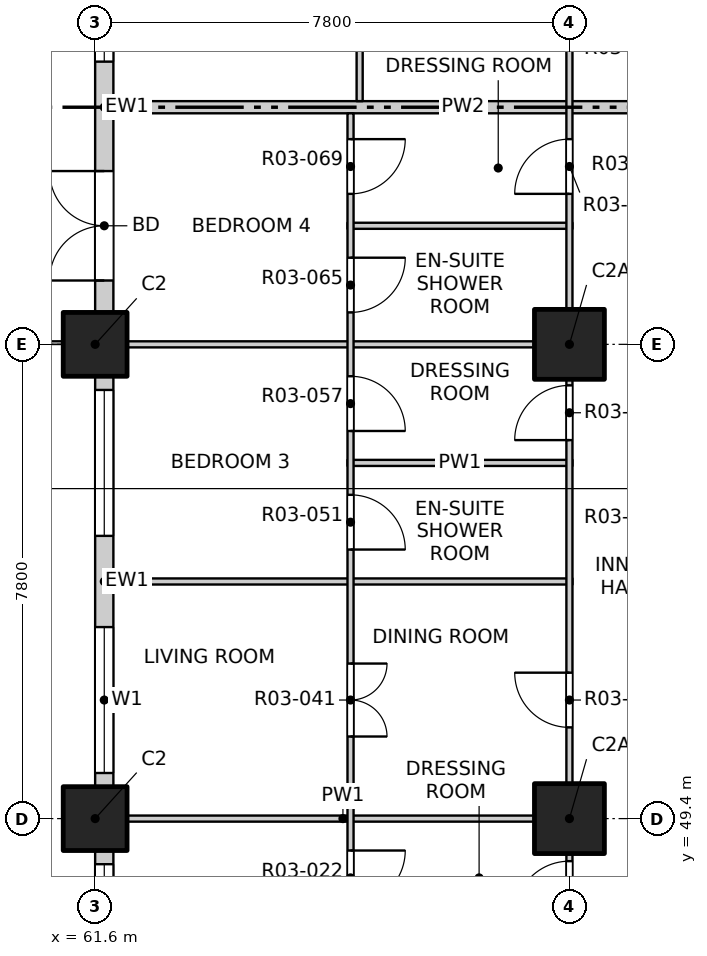
"""IFC4 building model, lengths in metres.
Left out: names, types, materials, properties, quantities, classifications, styles, units other than length and angle.
Written with IfcOpenShell. Run it as: python <this file> out.ifc"""

import sys

from ifc_helpers import new_model, si_unit, direction, frame, frame_2d, origin, origin_2d, place, context, subcontext, project, spatial, rectangle, extrude, element, fill, save


model = new_model("IFC4")
c1 = context("Model", 3, precision=1e-05, world=origin(), true_north=direction((0.0, 1.0)))
c2 = subcontext(c1, "Body", "Model", "MODEL_VIEW")
j1 = project(units=[si_unit("LENGTHUNIT", "METRE"), si_unit("PLANEANGLEUNIT", "RADIAN")], contexts=[c1])
p1 = place(None, origin())
s1 = spatial("IfcSite", under=j1, at=p1, CompositionType="ELEMENT")
p2 = place(p1, origin())
s2 = spatial("IfcBuilding", under=s1, at=p2, CompositionType="ELEMENT")
p3 = place(p2, frame((0.0, 0.0, 43.3)))
s3 = spatial("IfcBuildingStorey", under=s2, at=p3, CompositionType="ELEMENT", Elevation=43.3)
for number, where, z_axis, x_axis in (
    (1, (61.6, 49.4, -0.25), (0.0, 0.0, 1.0), (1.0, 0.0, 0.0)),
    (2, (61.6, 57.2, -0.25), (0.0, 0.0, 1.0), (1.0, 0.0, 0.0)),
):
    element("IfcColumn", number, at=place(p3, frame(where, z_axis=z_axis, x_axis=x_axis)), inside=s3, PredefinedType="COLUMN", context=c2, shape_type="SweptSolid", body=[
        extrude(rectangle(XDim=1.05, YDim=1.05, at=origin_2d()), origin(), (0.0, 0.0, 1.0), 3.35),
    ])
for number, where, z_axis, x_axis in (
    (3, (69.4, 49.4, -0.25), (0.0, 0.0, 1.0), (1.0, 0.0, 0.0)),
    (4, (69.4, 57.2, -0.25), (0.0, 0.0, 1.0), (1.0, 0.0, 0.0)),
):
    element("IfcColumn", number, at=place(p3, frame(where, z_axis=z_axis, x_axis=x_axis)), inside=s3, PredefinedType="COLUMN", context=c2, shape_type="SweptSolid", body=[
        extrude(rectangle(XDim=1.15, YDim=1.15, at=origin_2d()), origin(), (0.0, 0.0, 1.0), 3.35),
    ])
p4 = place(p3, frame((61.75, 45.5, 0.0), z_axis=(0.0, 0.0, 1.0), x_axis=(0.0, 1.0, 0.0)))
e5 = element("IfcWall", 5, at=p4, inside=s3, PredefinedType="SOLIDWALL", context=c2, shape_type="SweptSolid", body=[
    extrude(rectangle(XDim=3.375, YDim=0.3, at=frame_2d((1.688, 0.0))), origin(), (0.0, 0.0, 1.0), 3.1),
])
p5 = place(p4, frame((0.75, 0.0, 0.9)))
e6 = element("IfcOpeningElement", 6, at=p5, cuts=e5, PredefinedType="OPENING", context=c2, shape_type="SweptSolid", body=[
    extrude(rectangle(XDim=2.4, YDim=1.8, at=frame_2d((1.2, 0.9))), frame((0.0, 0.16, 0.0), z_axis=(0.0, -1.0, 0.0), x_axis=(1.0, 0.0, 0.0)), (0.0, 0.0, 1.0), 0.32),
])
p6 = place(p3, frame((61.75, 49.925, 0.0), z_axis=(0.0, 0.0, 1.0), x_axis=(0.0, 1.0, 0.0)))
e7 = element("IfcWall", 7, at=p6, inside=s3, PredefinedType="SOLIDWALL", context=c2, shape_type="SweptSolid", body=[
    extrude(rectangle(XDim=6.75, YDim=0.3, at=frame_2d((3.375, 0.0))), origin(), (0.0, 0.0, 1.0), 3.1),
])
p7 = place(p6, frame((0.225, 0.0, 0.9)))
e8 = element("IfcOpeningElement", 8, at=p7, cuts=e7, PredefinedType="OPENING", context=c2, shape_type="SweptSolid", body=[
    extrude(rectangle(XDim=2.4, YDim=1.8, at=frame_2d((1.2, 0.9))), frame((0.0, 0.16, 0.0), z_axis=(0.0, -1.0, 0.0), x_axis=(1.0, 0.0, 0.0)), (0.0, 0.0, 1.0), 0.32),
])
p8 = place(p6, frame((4.125, 0.0, 0.9)))
e9 = element("IfcOpeningElement", 9, at=p8, cuts=e7, PredefinedType="OPENING", context=c2, shape_type="SweptSolid", body=[
    extrude(rectangle(XDim=2.4, YDim=1.8, at=frame_2d((1.2, 0.9))), frame((0.0, 0.16, 0.0), z_axis=(0.0, -1.0, 0.0), x_axis=(1.0, 0.0, 0.0)), (0.0, 0.0, 1.0), 0.32),
])
p9 = place(p3, frame((61.75, 57.725, 0.0), z_axis=(0.0, 0.0, 1.0), x_axis=(0.0, 1.0, 0.0)))
e10 = element("IfcWall", 10, at=p9, inside=s3, PredefinedType="SOLIDWALL", context=c2, shape_type="SweptSolid", body=[
    extrude(rectangle(XDim=6.75, YDim=0.3, at=frame_2d((3.375, 0.0))), origin(), (0.0, 0.0, 1.0), 3.1),
])
p10 = place(p9, frame((0.525, 0.0, 0.0)))
e11 = element("IfcOpeningElement", 11, at=p10, cuts=e10, PredefinedType="OPENING", context=c2, shape_type="SweptSolid", body=[
    extrude(rectangle(XDim=1.8, YDim=2.4, at=frame_2d((0.9, 1.2))), frame((0.0, 0.16, 0.0), z_axis=(0.0, -1.0, 0.0), x_axis=(1.0, 0.0, 0.0)), (0.0, 0.0, 1.0), 0.32),
])
p11 = place(p9, frame((4.125, 0.0, 0.9)))
e12 = element("IfcOpeningElement", 12, at=p11, cuts=e10, PredefinedType="OPENING", context=c2, shape_type="SweptSolid", body=[
    extrude(rectangle(XDim=2.4, YDim=1.8, at=frame_2d((1.2, 0.9))), frame((0.0, 0.16, 0.0), z_axis=(0.0, -1.0, 0.0), x_axis=(1.0, 0.0, 0.0)), (0.0, 0.0, 1.0), 0.32),
])
for number, where, z_axis, x_axis in (
    (13, (61.9, 49.4, 0.0), (0.0, 0.0, 1.0), (1.0, 0.0, 0.0)),
    (14, (61.9, 53.3, 0.0), (0.0, 0.0, 1.0), (1.0, 0.0, 0.0)),
):
    element("IfcWall", number, at=place(p3, frame(where, z_axis=z_axis, x_axis=x_axis)), inside=s3, PredefinedType="PARTITIONING", context=c2, shape_type="SweptSolid", body=[
        extrude(rectangle(XDim=7.55, YDim=0.1, at=frame_2d((3.775, 0.0))), origin(), (0.0, 0.0, 1.0), 3.1),
    ])
p12 = place(p3, frame((65.75, 55.25, 0.0), z_axis=(0.0, 0.0, 1.0), x_axis=(1.0, 0.0, 0.0)))
e15 = element("IfcWall", 15, at=p12, inside=s3, PredefinedType="PARTITIONING", context=c2, shape_type="SweptSolid", body=[
    extrude(rectangle(XDim=3.7, YDim=0.1, at=frame_2d((1.85, 0.0))), origin(), (0.0, 0.0, 1.0), 3.1),
])
p13 = place(p3, frame((61.9, 57.2, 0.0), z_axis=(0.0, 0.0, 1.0), x_axis=(1.0, 0.0, 0.0)))
e16 = element("IfcWall", 16, at=p13, inside=s3, PredefinedType="PARTITIONING", context=c2, shape_type="SweptSolid", body=[
    extrude(rectangle(XDim=7.55, YDim=0.1, at=frame_2d((3.775, 0.0))), origin(), (0.0, 0.0, 1.0), 3.1),
])
p14 = place(p3, frame((65.75, 59.15, 0.0), z_axis=(0.0, 0.0, 1.0), x_axis=(1.0, 0.0, 0.0)))
e17 = element("IfcWall", 17, at=p14, inside=s3, PredefinedType="PARTITIONING", context=c2, shape_type="SweptSolid", body=[
    extrude(rectangle(XDim=3.7, YDim=0.1, at=frame_2d((1.85, 0.0))), origin(), (0.0, 0.0, 1.0), 3.1),
])
p15 = place(p3, frame((61.9, 61.1, 0.0), z_axis=(0.0, 0.0, 1.0), x_axis=(1.0, 0.0, 0.0)))
e18 = element("IfcWall", 18, at=p15, inside=s3, PredefinedType="PARTITIONING", context=c2, shape_type="SweptSolid", body=[
    extrude(rectangle(XDim=11.5, YDim=0.2, at=frame_2d((5.75, 0.0))), origin(), (0.0, 0.0, 1.0), 3.1),
])
p16 = place(p3, frame((65.8, 41.9, 0.0), z_axis=(0.0, 0.0, 1.0), x_axis=(0.0, 1.0, 0.0)))
e19 = element("IfcWall", 19, at=p16, inside=s3, PredefinedType="PARTITIONING", context=c2, shape_type="SweptSolid", body=[
    extrude(rectangle(XDim=19.1, YDim=0.1, at=frame_2d((9.55, 0.0))), origin(), (0.0, 0.0, 1.0), 3.1),
])
p17 = place(p16, frame((1.05, 0.0, 0.0)))
e20 = element("IfcOpeningElement", 20, at=p17, cuts=e19, PredefinedType="OPENING", context=c2, shape_type="SweptSolid", body=[
    extrude(rectangle(XDim=1.2, YDim=2.1, at=frame_2d((0.6, 1.05))), frame((0.0, 0.06, 0.0), z_axis=(0.0, -1.0, 0.0), x_axis=(1.0, 0.0, 0.0)), (0.0, 0.0, 1.0), 0.12),
])
p18 = place(p16, frame((4.125, 0.0, 0.0)))
e21 = element("IfcOpeningElement", 21, at=p18, cuts=e19, PredefinedType="OPENING", context=c2, shape_type="SweptSolid", body=[
    extrude(rectangle(XDim=0.9, YDim=2.1, at=frame_2d((0.45, 1.05))), frame((0.0, 0.06, 0.0), z_axis=(0.0, -1.0, 0.0), x_axis=(1.0, 0.0, 0.0)), (0.0, 0.0, 1.0), 0.12),
])
p19 = place(p16, frame((6.075, 0.0, 0.0)))
e22 = element("IfcOpeningElement", 22, at=p19, cuts=e19, PredefinedType="OPENING", context=c2, shape_type="SweptSolid", body=[
    extrude(rectangle(XDim=0.9, YDim=2.1, at=frame_2d((0.45, 1.05))), frame((0.0, 0.06, 0.0), z_axis=(0.0, -1.0, 0.0), x_axis=(1.0, 0.0, 0.0)), (0.0, 0.0, 1.0), 0.12),
])
p20 = place(p16, frame((8.85, 0.0, 0.0)))
e23 = element("IfcOpeningElement", 23, at=p20, cuts=e19, PredefinedType="OPENING", context=c2, shape_type="SweptSolid", body=[
    extrude(rectangle(XDim=1.2, YDim=2.1, at=frame_2d((0.6, 1.05))), frame((0.0, 0.06, 0.0), z_axis=(0.0, -1.0, 0.0), x_axis=(1.0, 0.0, 0.0)), (0.0, 0.0, 1.0), 0.12),
])
p21 = place(p16, frame((11.925, 0.0, 0.0)))
e24 = element("IfcOpeningElement", 24, at=p21, cuts=e19, PredefinedType="OPENING", context=c2, shape_type="SweptSolid", body=[
    extrude(rectangle(XDim=0.9, YDim=2.1, at=frame_2d((0.45, 1.05))), frame((0.0, 0.06, 0.0), z_axis=(0.0, -1.0, 0.0), x_axis=(1.0, 0.0, 0.0)), (0.0, 0.0, 1.0), 0.12),
])
p22 = place(p16, frame((13.875, 0.0, 0.0)))
e25 = element("IfcOpeningElement", 25, at=p22, cuts=e19, PredefinedType="OPENING", context=c2, shape_type="SweptSolid", body=[
    extrude(rectangle(XDim=0.9, YDim=2.1, at=frame_2d((0.45, 1.05))), frame((0.0, 0.06, 0.0), z_axis=(0.0, -1.0, 0.0), x_axis=(1.0, 0.0, 0.0)), (0.0, 0.0, 1.0), 0.12),
])
p23 = place(p16, frame((15.825, 0.0, 0.0)))
e26 = element("IfcOpeningElement", 26, at=p23, cuts=e19, PredefinedType="OPENING", context=c2, shape_type="SweptSolid", body=[
    extrude(rectangle(XDim=0.9, YDim=2.1, at=frame_2d((0.45, 1.05))), frame((0.0, 0.06, 0.0), z_axis=(0.0, -1.0, 0.0), x_axis=(1.0, 0.0, 0.0)), (0.0, 0.0, 1.0), 0.12),
])
p24 = place(p16, frame((17.775, 0.0, 0.0)))
e27 = element("IfcOpeningElement", 27, at=p24, cuts=e19, PredefinedType="OPENING", context=c2, shape_type="SweptSolid", body=[
    extrude(rectangle(XDim=0.9, YDim=2.1, at=frame_2d((0.45, 1.05))), frame((0.0, 0.06, 0.0), z_axis=(0.0, -1.0, 0.0), x_axis=(1.0, 0.0, 0.0)), (0.0, 0.0, 1.0), 0.12),
])
p25 = place(p3, frame((65.95, 61.2, 0.0), z_axis=(0.0, 0.0, 1.0), x_axis=(0.0, 1.0, 0.0)))
e28 = element("IfcWall", 28, at=p25, inside=s3, PredefinedType="PARTITIONING", context=c2, shape_type="SweptSolid", body=[
    extrude(rectangle(XDim=7.6, YDim=0.1, at=frame_2d((3.8, 0.0))), origin(), (0.0, 0.0, 1.0), 3.1),
])
p26 = place(p25, frame((1.25, 0.0, 0.0)))
e29 = element("IfcOpeningElement", 29, at=p26, cuts=e28, PredefinedType="OPENING", context=c2, shape_type="SweptSolid", body=[
    extrude(rectangle(XDim=1.2, YDim=2.1, at=frame_2d((0.6, 1.05))), frame((0.0, 0.06, 0.0), z_axis=(0.0, -1.0, 0.0), x_axis=(1.0, 0.0, 0.0)), (0.0, 0.0, 1.0), 0.12),
])
p27 = place(p25, frame((4.325, 0.0, 0.0)))
e30 = element("IfcOpeningElement", 30, at=p27, cuts=e28, PredefinedType="OPENING", context=c2, shape_type="SweptSolid", body=[
    extrude(rectangle(XDim=0.9, YDim=2.1, at=frame_2d((0.45, 1.05))), frame((0.0, 0.06, 0.0), z_axis=(0.0, -1.0, 0.0), x_axis=(1.0, 0.0, 0.0)), (0.0, 0.0, 1.0), 0.12),
])
p28 = place(p25, frame((6.275, 0.0, 0.0)))
e31 = element("IfcOpeningElement", 31, at=p28, cuts=e28, PredefinedType="OPENING", context=c2, shape_type="SweptSolid", body=[
    extrude(rectangle(XDim=0.9, YDim=2.1, at=frame_2d((0.45, 1.05))), frame((0.0, 0.06, 0.0), z_axis=(0.0, -1.0, 0.0), x_axis=(1.0, 0.0, 0.0)), (0.0, 0.0, 1.0), 0.12),
])
p29 = place(p3, frame((69.4, 41.9, 0.0), z_axis=(0.0, 0.0, 1.0), x_axis=(0.0, 1.0, 0.0)))
e32 = element("IfcWall", 32, at=p29, inside=s3, PredefinedType="PARTITIONING", context=c2, shape_type="SweptSolid", body=[
    extrude(rectangle(XDim=46.2, YDim=0.1, at=frame_2d((23.1, 0.0))), origin(), (0.0, 0.0, 1.0), 3.1),
])
p30 = place(p29, frame((1.2, 0.0, 0.0)))
e33 = element("IfcOpeningElement", 33, at=p30, cuts=e32, PredefinedType="OPENING", context=c2, shape_type="SweptSolid", body=[
    extrude(rectangle(XDim=0.9, YDim=2.1, at=frame_2d((0.45, 1.05))), frame((0.0, 0.06, 0.0), z_axis=(0.0, -1.0, 0.0), x_axis=(1.0, 0.0, 0.0)), (0.0, 0.0, 1.0), 0.12),
])
p31 = place(p29, frame((5.9, 0.0, 0.0)))
e34 = element("IfcOpeningElement", 34, at=p31, cuts=e32, PredefinedType="OPENING", context=c2, shape_type="SweptSolid", body=[
    extrude(rectangle(XDim=0.9, YDim=2.1, at=frame_2d((0.45, 1.05))), frame((0.0, 0.06, 0.0), z_axis=(0.0, -1.0, 0.0), x_axis=(1.0, 0.0, 0.0)), (0.0, 0.0, 1.0), 0.12),
])
p32 = place(p29, frame((9.0, 0.0, 0.0)))
e35 = element("IfcOpeningElement", 35, at=p32, cuts=e32, PredefinedType="OPENING", context=c2, shape_type="SweptSolid", body=[
    extrude(rectangle(XDim=0.9, YDim=2.1, at=frame_2d((0.45, 1.05))), frame((0.0, 0.06, 0.0), z_axis=(0.0, -1.0, 0.0), x_axis=(1.0, 0.0, 0.0)), (0.0, 0.0, 1.0), 0.12),
])
p33 = place(p29, frame((13.725, 0.0, 0.0)))
e36 = element("IfcOpeningElement", 36, at=p33, cuts=e32, PredefinedType="OPENING", context=c2, shape_type="SweptSolid", body=[
    extrude(rectangle(XDim=0.9, YDim=2.1, at=frame_2d((0.45, 1.05))), frame((0.0, 0.06, 0.0), z_axis=(0.0, -1.0, 0.0), x_axis=(1.0, 0.0, 0.0)), (0.0, 0.0, 1.0), 0.12),
])
p34 = place(p29, frame((17.775, 0.0, 0.0)))
e37 = element("IfcOpeningElement", 37, at=p34, cuts=e32, PredefinedType="OPENING", context=c2, shape_type="SweptSolid", body=[
    extrude(rectangle(XDim=0.9, YDim=2.1, at=frame_2d((0.45, 1.05))), frame((0.0, 0.06, 0.0), z_axis=(0.0, -1.0, 0.0), x_axis=(1.0, 0.0, 0.0)), (0.0, 0.0, 1.0), 0.12),
])
p35 = place(p29, frame((20.7, 0.0, 0.0)))
e38 = element("IfcOpeningElement", 38, at=p35, cuts=e32, PredefinedType="OPENING", context=c2, shape_type="SweptSolid", body=[
    extrude(rectangle(XDim=0.9, YDim=2.1, at=frame_2d((0.45, 1.05))), frame((0.0, 0.06, 0.0), z_axis=(0.0, -1.0, 0.0), x_axis=(1.0, 0.0, 0.0)), (0.0, 0.0, 1.0), 0.12),
])
p36 = place(p29, frame((25.575, 0.0, 0.0)))
e39 = element("IfcOpeningElement", 39, at=p36, cuts=e32, PredefinedType="OPENING", context=c2, shape_type="SweptSolid", body=[
    extrude(rectangle(XDim=0.9, YDim=2.1, at=frame_2d((0.45, 1.05))), frame((0.0, 0.06, 0.0), z_axis=(0.0, -1.0, 0.0), x_axis=(1.0, 0.0, 0.0)), (0.0, 0.0, 1.0), 0.12),
])
p37 = place(p29, frame((28.5, 0.0, 0.0)))
e40 = element("IfcOpeningElement", 40, at=p37, cuts=e32, PredefinedType="OPENING", context=c2, shape_type="SweptSolid", body=[
    extrude(rectangle(XDim=0.9, YDim=2.1, at=frame_2d((0.45, 1.05))), frame((0.0, 0.06, 0.0), z_axis=(0.0, -1.0, 0.0), x_axis=(1.0, 0.0, 0.0)), (0.0, 0.0, 1.0), 0.12),
])
p38 = place(p29, frame((33.375, 0.0, 0.0)))
e41 = element("IfcOpeningElement", 41, at=p38, cuts=e32, PredefinedType="OPENING", context=c2, shape_type="SweptSolid", body=[
    extrude(rectangle(XDim=0.9, YDim=2.1, at=frame_2d((0.45, 1.05))), frame((0.0, 0.06, 0.0), z_axis=(0.0, -1.0, 0.0), x_axis=(1.0, 0.0, 0.0)), (0.0, 0.0, 1.0), 0.12),
])
p39 = place(p29, frame((36.3, 0.0, 0.0)))
e42 = element("IfcOpeningElement", 42, at=p39, cuts=e32, PredefinedType="OPENING", context=c2, shape_type="SweptSolid", body=[
    extrude(rectangle(XDim=0.9, YDim=2.1, at=frame_2d((0.45, 1.05))), frame((0.0, 0.06, 0.0), z_axis=(0.0, -1.0, 0.0), x_axis=(1.0, 0.0, 0.0)), (0.0, 0.0, 1.0), 0.12),
])
p40 = place(p29, frame((40.2, 0.0, 0.0)))
e43 = element("IfcOpeningElement", 43, at=p40, cuts=e32, PredefinedType="OPENING", context=c2, shape_type="SweptSolid", body=[
    extrude(rectangle(XDim=0.9, YDim=2.1, at=frame_2d((0.45, 1.05))), frame((0.0, 0.06, 0.0), z_axis=(0.0, -1.0, 0.0), x_axis=(1.0, 0.0, 0.0)), (0.0, 0.0, 1.0), 0.12),
])
p41 = place(p29, frame((44.1, 0.0, 0.0)))
e44 = element("IfcOpeningElement", 44, at=p41, cuts=e32, PredefinedType="OPENING", context=c2, shape_type="SweptSolid", body=[
    extrude(rectangle(XDim=0.9, YDim=2.1, at=frame_2d((0.45, 1.05))), frame((0.0, 0.06, 0.0), z_axis=(0.0, -1.0, 0.0), x_axis=(1.0, 0.0, 0.0)), (0.0, 0.0, 1.0), 0.12),
])
p42 = place(p5, origin())
e45 = element("IfcWindow", 45, at=p42, inside=s3, PartitioningType="DOUBLE_PANEL_VERTICAL", PredefinedType="WINDOW", context=c2, shape_type="SweptSolid", body=[
    extrude(rectangle(XDim=2.4, YDim=1.8, at=frame_2d((1.2, 0.9))), frame((0.0, 0.03, 0.0), z_axis=(0.0, -1.0, 0.0), x_axis=(1.0, 0.0, 0.0)), (0.0, 0.0, 1.0), 0.06),
])
fill(e6, e45)
p43 = place(p7, origin())
e46 = element("IfcWindow", 46, at=p43, inside=s3, PartitioningType="DOUBLE_PANEL_VERTICAL", PredefinedType="WINDOW", context=c2, shape_type="SweptSolid", body=[
    extrude(rectangle(XDim=2.4, YDim=1.8, at=frame_2d((1.2, 0.9))), frame((0.0, 0.03, 0.0), z_axis=(0.0, -1.0, 0.0), x_axis=(1.0, 0.0, 0.0)), (0.0, 0.0, 1.0), 0.06),
])
fill(e8, e46)
p44 = place(p8, origin())
e47 = element("IfcWindow", 47, at=p44, inside=s3, PartitioningType="DOUBLE_PANEL_VERTICAL", PredefinedType="WINDOW", context=c2, shape_type="SweptSolid", body=[
    extrude(rectangle(XDim=2.4, YDim=1.8, at=frame_2d((1.2, 0.9))), frame((0.0, 0.03, 0.0), z_axis=(0.0, -1.0, 0.0), x_axis=(1.0, 0.0, 0.0)), (0.0, 0.0, 1.0), 0.06),
])
fill(e9, e47)
p45 = place(p10, origin())
e48 = element("IfcDoor", 48, at=p45, inside=s3, OperationType="DOUBLE_DOOR_SINGLE_SWING", PredefinedType="DOOR", context=c2, shape_type="SweptSolid", body=[
    extrude(rectangle(XDim=1.8, YDim=2.4, at=frame_2d((0.9, 1.2))), frame((0.0, 0.025, 0.0), z_axis=(0.0, -1.0, 0.0), x_axis=(1.0, 0.0, 0.0)), (0.0, 0.0, 1.0), 0.05),
])
fill(e11, e48)
p46 = place(p11, origin())
e49 = element("IfcWindow", 49, at=p46, inside=s3, PartitioningType="DOUBLE_PANEL_VERTICAL", PredefinedType="WINDOW", context=c2, shape_type="SweptSolid", body=[
    extrude(rectangle(XDim=2.4, YDim=1.8, at=frame_2d((1.2, 0.9))), frame((0.0, 0.03, 0.0), z_axis=(0.0, -1.0, 0.0), x_axis=(1.0, 0.0, 0.0)), (0.0, 0.0, 1.0), 0.06),
])
fill(e12, e49)
p47 = place(p31, origin())
e50 = element("IfcDoor", 50, at=p47, inside=s3, OperationType="SINGLE_SWING_LEFT", PredefinedType="DOOR", context=c2, shape_type="SweptSolid", body=[
    extrude(rectangle(XDim=0.9, YDim=2.1, at=frame_2d((0.45, 1.05))), frame((0.0, 0.025, 0.0), z_axis=(0.0, -1.0, 0.0), x_axis=(1.0, 0.0, 0.0)), (0.0, 0.0, 1.0), 0.05),
])
fill(e34, e50)
p48 = place(p19, origin())
e51 = element("IfcDoor", 51, at=p48, inside=s3, OperationType="SINGLE_SWING_LEFT", PredefinedType="DOOR", context=c2, shape_type="SweptSolid", body=[
    extrude(rectangle(XDim=0.9, YDim=2.1, at=frame_2d((0.45, 1.05))), frame((0.0, 0.025, 0.0), z_axis=(0.0, -1.0, 0.0), x_axis=(1.0, 0.0, 0.0)), (0.0, 0.0, 1.0), 0.05),
])
fill(e22, e51)
p49 = place(p20, origin())
e52 = element("IfcDoor", 52, at=p49, inside=s3, OperationType="DOUBLE_DOOR_SINGLE_SWING", PredefinedType="DOOR", context=c2, shape_type="SweptSolid", body=[
    extrude(rectangle(XDim=1.2, YDim=2.1, at=frame_2d((0.6, 1.05))), frame((0.0, 0.025, 0.0), z_axis=(0.0, -1.0, 0.0), x_axis=(1.0, 0.0, 0.0)), (0.0, 0.0, 1.0), 0.05),
])
fill(e23, e52)
p50 = place(p32, origin())
e53 = element("IfcDoor", 53, at=p50, inside=s3, OperationType="SINGLE_SWING_RIGHT", PredefinedType="DOOR", context=c2, shape_type="SweptSolid", body=[
    extrude(rectangle(XDim=0.9, YDim=2.1, at=frame_2d((0.45, 1.05))), frame((0.0, 0.025, 0.0), z_axis=(0.0, -1.0, 0.0), x_axis=(1.0, 0.0, 0.0)), (0.0, 0.0, 1.0), 0.05),
])
fill(e35, e53)
p51 = place(p21, origin())
e54 = element("IfcDoor", 54, at=p51, inside=s3, OperationType="SINGLE_SWING_RIGHT", PredefinedType="DOOR", context=c2, shape_type="SweptSolid", body=[
    extrude(rectangle(XDim=0.9, YDim=2.1, at=frame_2d((0.45, 1.05))), frame((0.0, 0.025, 0.0), z_axis=(0.0, -1.0, 0.0), x_axis=(1.0, 0.0, 0.0)), (0.0, 0.0, 1.0), 0.05),
])
fill(e24, e54)
p52 = place(p33, origin())
e55 = element("IfcDoor", 55, at=p52, inside=s3, OperationType="SINGLE_SWING_LEFT", PredefinedType="DOOR", context=c2, shape_type="SweptSolid", body=[
    extrude(rectangle(XDim=0.9, YDim=2.1, at=frame_2d((0.45, 1.05))), frame((0.0, 0.025, 0.0), z_axis=(0.0, -1.0, 0.0), x_axis=(1.0, 0.0, 0.0)), (0.0, 0.0, 1.0), 0.05),
])
fill(e36, e55)
p53 = place(p22, origin())
e56 = element("IfcDoor", 56, at=p53, inside=s3, OperationType="SINGLE_SWING_RIGHT", PredefinedType="DOOR", context=c2, shape_type="SweptSolid", body=[
    extrude(rectangle(XDim=0.9, YDim=2.1, at=frame_2d((0.45, 1.05))), frame((0.0, 0.025, 0.0), z_axis=(0.0, -1.0, 0.0), x_axis=(1.0, 0.0, 0.0)), (0.0, 0.0, 1.0), 0.05),
])
fill(e25, e56)
p54 = place(p23, origin())
e57 = element("IfcDoor", 57, at=p54, inside=s3, OperationType="SINGLE_SWING_LEFT", PredefinedType="DOOR", context=c2, shape_type="SweptSolid", body=[
    extrude(rectangle(XDim=0.9, YDim=2.1, at=frame_2d((0.45, 1.05))), frame((0.0, 0.025, 0.0), z_axis=(0.0, -1.0, 0.0), x_axis=(1.0, 0.0, 0.0)), (0.0, 0.0, 1.0), 0.05),
])
fill(e26, e57)
p55 = place(p24, origin())
e58 = element("IfcDoor", 58, at=p55, inside=s3, OperationType="SINGLE_SWING_LEFT", PredefinedType="DOOR", context=c2, shape_type="SweptSolid", body=[
    extrude(rectangle(XDim=0.9, YDim=2.1, at=frame_2d((0.45, 1.05))), frame((0.0, 0.025, 0.0), z_axis=(0.0, -1.0, 0.0), x_axis=(1.0, 0.0, 0.0)), (0.0, 0.0, 1.0), 0.05),
])
fill(e27, e58)
p56 = place(p34, origin())
e59 = element("IfcDoor", 59, at=p56, inside=s3, OperationType="SINGLE_SWING_LEFT", PredefinedType="DOOR", context=c2, shape_type="SweptSolid", body=[
    extrude(rectangle(XDim=0.9, YDim=2.1, at=frame_2d((0.45, 1.05))), frame((0.0, 0.025, 0.0), z_axis=(0.0, -1.0, 0.0), x_axis=(1.0, 0.0, 0.0)), (0.0, 0.0, 1.0), 0.05),
])
fill(e37, e59)
save(model, sys.argv[1])
